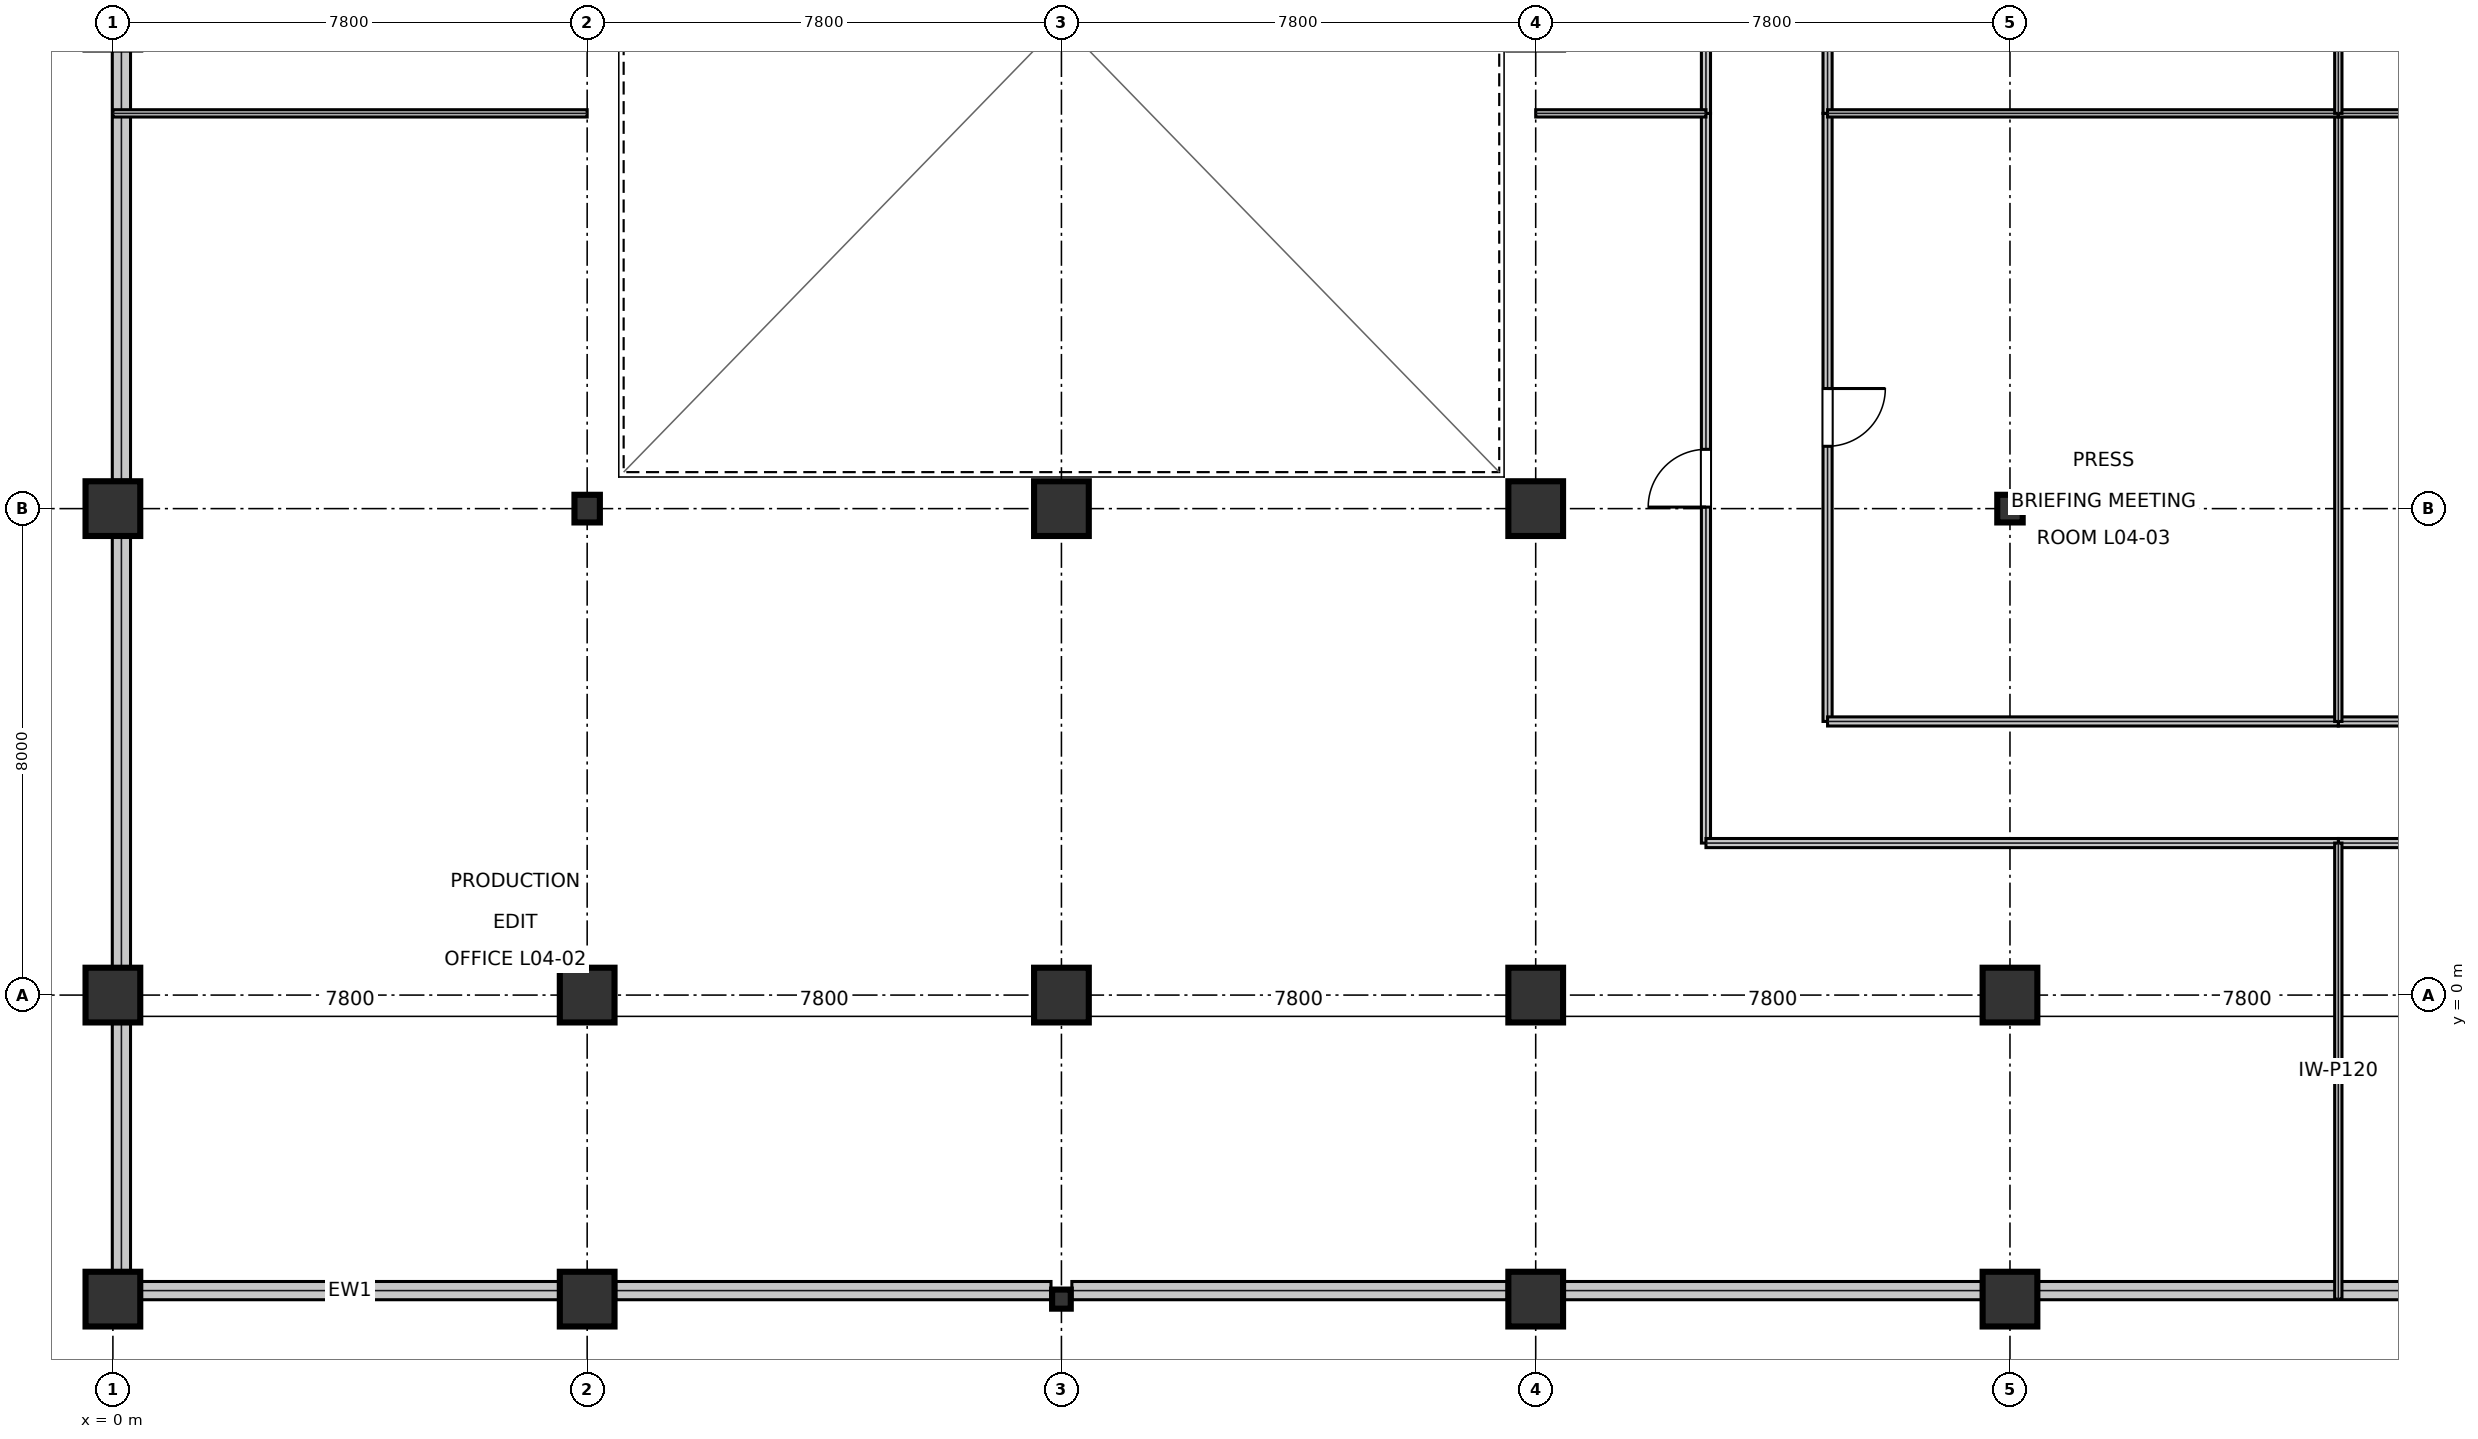
"""IFC4 building model, lengths in metres.
Left out: names, types, materials, properties, quantities, classifications, styles, units other than length and angle.
Written with IfcOpenShell. Run it as: python <this file> out.ifc"""

import sys

from ifc_helpers import new_model, si_unit, direction, frame, frame_2d, origin, origin_2d, place, context, subcontext, project, spatial, rectangle, i_section, extrude, element, fill, save


model = new_model("IFC4")
c1 = context("Model", 3, precision=1e-05, world=origin(), true_north=direction((0.0, 1.0)))
c2 = subcontext(c1, "Body", "Model", "MODEL_VIEW")
j1 = project(units=[si_unit("LENGTHUNIT", "METRE"), si_unit("PLANEANGLEUNIT", "RADIAN")], contexts=[c1])
p1 = place(None, origin())
s1 = spatial("IfcSite", under=j1, at=p1, CompositionType="ELEMENT")
p2 = place(p1, origin())
s2 = spatial("IfcBuilding", under=s1, at=p2, CompositionType="ELEMENT")
p3 = place(p2, frame((0.0, 0.0, 21.6)))
s3 = spatial("IfcBuildingStorey", under=s2, at=p3, CompositionType="ELEMENT", Elevation=21.6)
for number, where, z_axis, x_axis in (
    (1, (0.0, -5.0, 0.0), (0.0, 0.0, 1.0), (1.0, 0.0, 0.0)),
    (2, (0.0, 0.0, 0.0), (0.0, 0.0, 1.0), (1.0, 0.0, 0.0)),
    (3, (0.0, 8.0, 0.0), (0.0, 0.0, 1.0), (1.0, 0.0, 0.0)),
    (4, (7.8, -5.0, 0.0), (0.0, 0.0, 1.0), (1.0, 0.0, 0.0)),
    (5, (7.8, 0.0, 0.0), (0.0, 0.0, 1.0), (1.0, 0.0, 0.0)),
):
    element("IfcColumn", number, at=place(p3, frame(where, z_axis=z_axis, x_axis=x_axis)), inside=s3, PredefinedType="COLUMN", context=c2, shape_type="SweptSolid", body=[
        extrude(rectangle(XDim=0.9, YDim=0.9, at=origin_2d()), origin(), (0.0, 0.0, 1.0), 5.395),
    ])
p4 = place(p3, frame((7.8, 8.0, 0.0), z_axis=(0.0, 0.0, 1.0), x_axis=(1.0, 0.0, 0.0)))
e6 = element("IfcColumn", 6, at=p4, inside=s3, PredefinedType="COLUMN", context=c2, shape_type="SweptSolid", body=[
    extrude(i_section(OverallWidth=0.418, OverallDepth=0.455, WebThickness=0.042, FlangeThickness=0.068, at=origin_2d()), origin(), (0.0, 0.0, 1.0), 5.395),
])
p5 = place(p3, frame((15.6, -5.0, 0.0), z_axis=(0.0, 0.0, 1.0), x_axis=(1.0, 0.0, 0.0)))
e7 = element("IfcColumn", 7, at=p5, inside=s3, PredefinedType="COLUMN", context=c2, shape_type="SweptSolid", body=[
    extrude(i_section(OverallWidth=0.307, OverallDepth=0.314, WebThickness=0.011, FlangeThickness=0.019, at=origin_2d()), origin(), (0.0, 0.0, 1.0), 5.395),
])
for number, where, z_axis, x_axis in (
    (8, (15.6, 0.0, 0.0), (0.0, 0.0, 1.0), (1.0, 0.0, 0.0)),
    (9, (15.6, 8.0, 0.0), (0.0, 0.0, 1.0), (1.0, 0.0, 0.0)),
    (10, (23.4, -5.0, 0.0), (0.0, 0.0, 1.0), (1.0, 0.0, 0.0)),
    (11, (23.4, 0.0, 0.0), (0.0, 0.0, 1.0), (1.0, 0.0, 0.0)),
    (12, (23.4, 8.0, 0.0), (0.0, 0.0, 1.0), (1.0, 0.0, 0.0)),
    (13, (31.2, -5.0, 0.0), (0.0, 0.0, 1.0), (1.0, 0.0, 0.0)),
    (14, (31.2, 0.0, 0.0), (0.0, 0.0, 1.0), (1.0, 0.0, 0.0)),
):
    element("IfcColumn", number, at=place(p3, frame(where, z_axis=z_axis, x_axis=x_axis)), inside=s3, PredefinedType="COLUMN", context=c2, shape_type="SweptSolid", body=[
        extrude(rectangle(XDim=0.9, YDim=0.9, at=origin_2d()), origin(), (0.0, 0.0, 1.0), 5.395),
    ])
p6 = place(p3, frame((31.2, 8.0, 0.0), z_axis=(0.0, 0.0, 1.0), x_axis=(1.0, 0.0, 0.0)))
e15 = element("IfcColumn", 15, at=p6, inside=s3, PredefinedType="COLUMN", context=c2, shape_type="SweptSolid", body=[
    extrude(i_section(OverallWidth=0.418, OverallDepth=0.455, WebThickness=0.042, FlangeThickness=0.068, at=origin_2d()), origin(), (0.0, 0.0, 1.0), 5.395),
])
p7 = place(p3, frame((0.468, -4.86, 0.0), z_axis=(0.0, 0.0, 1.0), x_axis=(1.0, 0.0, 0.0)))
e16 = element("IfcWall", 16, at=p7, inside=s3, PredefinedType="STANDARD", context=c2, shape_type="SweptSolid", body=[
    extrude(rectangle(XDim=6.864, YDim=0.3, at=frame_2d((3.432, 0.0))), origin(), (0.0, 0.0, 1.0), 4.608),
])
for number, where, z_axis, x_axis in (
    (17, (8.268, -4.86, 0.0), (0.0, 0.0, 1.0), (1.0, 0.0, 0.0)),
    (18, (15.771, -4.86, 0.0), (0.0, 0.0, 1.0), (1.0, 0.0, 0.0)),
):
    element("IfcWall", number, at=place(p3, frame(where, z_axis=z_axis, x_axis=x_axis)), inside=s3, PredefinedType="STANDARD", context=c2, shape_type="SweptSolid", body=[
        extrude(rectangle(XDim=7.16, YDim=0.3, at=frame_2d((3.58, 0.0))), origin(), (0.0, 0.0, 1.0), 4.608),
    ])
for number, where, z_axis, x_axis in (
    (19, (23.868, -4.86, 0.0), (0.0, 0.0, 1.0), (1.0, 0.0, 0.0)),
    (20, (31.668, -4.86, 0.0), (0.0, 0.0, 1.0), (1.0, 0.0, 0.0)),
):
    element("IfcWall", number, at=place(p3, frame(where, z_axis=z_axis, x_axis=x_axis)), inside=s3, PredefinedType="STANDARD", context=c2, shape_type="SweptSolid", body=[
        extrude(rectangle(XDim=6.864, YDim=0.3, at=frame_2d((3.432, 0.0))), origin(), (0.0, 0.0, 1.0), 4.608),
    ])
for number, where, z_axis, x_axis in (
    (21, (0.14, 15.532, 0.0), (0.0, 0.0, 1.0), (0.0, -1.0, 0.0)),
    (22, (0.14, 7.532, 0.0), (0.0, 0.0, 1.0), (0.0, -1.0, 0.0)),
):
    element("IfcWall", number, at=place(p3, frame(where, z_axis=z_axis, x_axis=x_axis)), inside=s3, PredefinedType="STANDARD", context=c2, shape_type="SweptSolid", body=[
        extrude(rectangle(XDim=7.064, YDim=0.3, at=frame_2d((3.532, 0.0))), origin(), (0.0, 0.0, 1.0), 4.608),
    ])
p8 = place(p3, frame((0.14, -0.468, 0.0), z_axis=(0.0, 0.0, 1.0), x_axis=(0.0, -1.0, 0.0)))
e23 = element("IfcWall", 23, at=p8, inside=s3, PredefinedType="STANDARD", context=c2, shape_type="SweptSolid", body=[
    extrude(rectangle(XDim=4.064, YDim=0.3, at=frame_2d((2.032, 0.0))), origin(), (0.0, 0.0, 1.0), 4.608),
])
p9 = place(p3, frame((36.6, 2.5, 0.0), z_axis=(0.0, 0.0, 1.0), x_axis=(1.0, 0.0, 0.0)))
e24 = element("IfcWall", 24, at=p9, inside=s3, PredefinedType="PARTITIONING", context=c2, shape_type="SweptSolid", body=[
    extrude(rectangle(XDim=10.2, YDim=0.15, at=frame_2d((5.1, 0.0))), origin(), (0.0, 0.0, 1.0), 4.375),
])
p10 = place(p9, frame((4.625, 0.0, 0.0)))
e25 = element("IfcOpeningElement", 25, at=p10, cuts=e24, PredefinedType="OPENING", context=c2, shape_type="SweptSolid", body=[
    extrude(rectangle(XDim=0.95, YDim=2.15, at=frame_2d((0.475, 1.075))), frame((0.0, 0.085, 0.0), z_axis=(0.0, -1.0, 0.0), x_axis=(1.0, 0.0, 0.0)), (0.0, 0.0, 1.0), 0.17),
])
p11 = place(p3, frame((26.2, 2.5, 0.0), z_axis=(0.0, 0.0, 1.0), x_axis=(0.0, 1.0, 0.0)))
e26 = element("IfcWall", 26, at=p11, inside=s3, PredefinedType="PARTITIONING", context=c2, shape_type="SweptSolid", body=[
    extrude(rectangle(XDim=12.0, YDim=0.15, at=frame_2d((6.0, 0.0))), origin(), (0.0, 0.0, 1.0), 4.298),
])
p12 = place(p11, frame((5.525, 0.0, 0.0)))
e27 = element("IfcOpeningElement", 27, at=p12, cuts=e26, PredefinedType="OPENING", context=c2, shape_type="SweptSolid", body=[
    extrude(rectangle(XDim=0.95, YDim=2.15, at=frame_2d((0.475, 1.075))), frame((0.0, 0.085, 0.0), z_axis=(0.0, -1.0, 0.0), x_axis=(1.0, 0.0, 0.0)), (0.0, 0.0, 1.0), 0.17),
])
p13 = place(p3, frame((28.2, 4.5, 0.0), z_axis=(0.0, 0.0, 1.0), x_axis=(0.0, 1.0, 0.0)))
e28 = element("IfcWall", 28, at=p13, inside=s3, PredefinedType="PARTITIONING", context=c2, shape_type="SweptSolid", body=[
    extrude(rectangle(XDim=10.0, YDim=0.15, at=frame_2d((5.0, 0.0))), origin(), (0.0, 0.0, 1.0), 4.298),
])
p14 = place(p13, frame((4.525, 0.0, 0.0)))
e29 = element("IfcOpeningElement", 29, at=p14, cuts=e28, PredefinedType="OPENING", context=c2, shape_type="SweptSolid", body=[
    extrude(rectangle(XDim=0.95, YDim=2.15, at=frame_2d((0.475, 1.075))), frame((0.0, 0.085, 0.0), z_axis=(0.0, -1.0, 0.0), x_axis=(1.0, 0.0, 0.0)), (0.0, 0.0, 1.0), 0.17),
])
p15 = place(p3, frame((36.6, 4.5, 0.0), z_axis=(0.0, 0.0, 1.0), x_axis=(1.0, 0.0, 0.0)))
e30 = element("IfcWall", 30, at=p15, inside=s3, PredefinedType="PARTITIONING", context=c2, shape_type="SweptSolid", body=[
    extrude(rectangle(XDim=10.2, YDim=0.15, at=frame_2d((5.1, 0.0))), origin(), (0.0, 0.0, 1.0), 4.375),
])
p16 = place(p15, frame((4.625, 0.0, 0.0)))
e31 = element("IfcOpeningElement", 31, at=p16, cuts=e30, PredefinedType="OPENING", context=c2, shape_type="SweptSolid", body=[
    extrude(rectangle(XDim=0.95, YDim=2.15, at=frame_2d((0.475, 1.075))), frame((0.0, 0.085, 0.0), z_axis=(0.0, -1.0, 0.0), x_axis=(1.0, 0.0, 0.0)), (0.0, 0.0, 1.0), 0.17),
])
p17 = place(p3, frame((28.2, 14.5, 0.0), z_axis=(0.0, 0.0, 1.0), x_axis=(0.0, 1.0, 0.0)))
e32 = element("IfcWall", 32, at=p17, inside=s3, PredefinedType="PARTITIONING", context=c2, shape_type="SweptSolid", body=[
    extrude(rectangle(XDim=11.7, YDim=0.15, at=frame_2d((5.85, 0.0))), origin(), (0.0, 0.0, 1.0), 3.648),
])
p18 = place(p17, frame((5.375, 0.0, 0.0)))
e33 = element("IfcOpeningElement", 33, at=p18, cuts=e32, PredefinedType="OPENING", context=c2, shape_type="SweptSolid", body=[
    extrude(rectangle(XDim=0.95, YDim=2.15, at=frame_2d((0.475, 1.075))), frame((0.0, 0.085, 0.0), z_axis=(0.0, -1.0, 0.0), x_axis=(1.0, 0.0, 0.0)), (0.0, 0.0, 1.0), 0.17),
])
p19 = place(p3, frame((26.2, 14.5, 0.0), z_axis=(0.0, 0.0, 1.0), x_axis=(0.0, 1.0, 0.0)))
e34 = element("IfcWall", 34, at=p19, inside=s3, PredefinedType="PARTITIONING", context=c2, shape_type="SweptSolid", body=[
    extrude(rectangle(XDim=11.7, YDim=0.15, at=frame_2d((5.85, 0.0))), origin(), (0.0, 0.0, 1.0), 3.648),
])
p20 = place(p19, frame((5.375, 0.0, 0.0)))
e35 = element("IfcOpeningElement", 35, at=p20, cuts=e34, PredefinedType="OPENING", context=c2, shape_type="SweptSolid", body=[
    extrude(rectangle(XDim=0.95, YDim=2.15, at=frame_2d((0.475, 1.075))), frame((0.0, 0.085, 0.0), z_axis=(0.0, -1.0, 0.0), x_axis=(1.0, 0.0, 0.0)), (0.0, 0.0, 1.0), 0.17),
])
p21 = place(p3, frame((26.2, 2.5, 0.0), z_axis=(0.0, 0.0, 1.0), x_axis=(1.0, 0.0, 0.0)))
e36 = element("IfcWall", 36, at=p21, inside=s3, PredefinedType="PARTITIONING", context=c2, shape_type="SweptSolid", body=[
    extrude(rectangle(XDim=10.4, YDim=0.15, at=frame_2d((5.2, 0.0))), origin(), (0.0, 0.0, 1.0), 4.375),
])
p22 = place(p3, frame((28.2, 4.5, 0.0), z_axis=(0.0, 0.0, 1.0), x_axis=(1.0, 0.0, 0.0)))
e37 = element("IfcWall", 37, at=p22, inside=s3, PredefinedType="PARTITIONING", context=c2, shape_type="SweptSolid", body=[
    extrude(rectangle(XDim=8.4, YDim=0.15, at=frame_2d((4.2, 0.0))), origin(), (0.0, 0.0, 1.0), 4.375),
])
p23 = place(p3, frame((36.6, -5.0, 0.0), z_axis=(0.0, 0.0, 1.0), x_axis=(0.0, 1.0, 0.0)))
e38 = element("IfcWall", 38, at=p23, inside=s3, PredefinedType="PARTITIONING", context=c2, shape_type="SweptSolid", body=[
    extrude(rectangle(XDim=7.5, YDim=0.12, at=frame_2d((3.75, 0.0))), origin(), (0.0, 0.0, 1.0), 4.298),
])
p24 = place(p3, frame((23.4, 14.5, 0.0), z_axis=(0.0, 0.0, 1.0), x_axis=(1.0, 0.0, 0.0)))
e39 = element("IfcWall", 39, at=p24, inside=s3, PredefinedType="PARTITIONING", context=c2, shape_type="SweptSolid", body=[
    extrude(rectangle(XDim=2.8, YDim=0.12, at=frame_2d((1.4, 0.0))), origin(), (0.0, 0.0, 1.0), 5.08),
])
p25 = place(p3, frame((0.0, 14.5, 0.0), z_axis=(0.0, 0.0, 1.0), x_axis=(1.0, 0.0, 0.0)))
e40 = element("IfcWall", 40, at=p25, inside=s3, PredefinedType="PARTITIONING", context=c2, shape_type="SweptSolid", body=[
    extrude(rectangle(XDim=7.8, YDim=0.12, at=frame_2d((3.9, 0.0))), origin(), (0.0, 0.0, 1.0), 5.08),
])
p26 = place(p3, frame((36.6, 4.5, 0.0), z_axis=(0.0, 0.0, 1.0), x_axis=(0.0, 1.0, 0.0)))
e41 = element("IfcWall", 41, at=p26, inside=s3, PredefinedType="PARTITIONING", context=c2, shape_type="SweptSolid", body=[
    extrude(rectangle(XDim=10.0, YDim=0.12, at=frame_2d((5.0, 0.0))), origin(), (0.0, 0.0, 1.0), 4.298),
])
p27 = place(p3, frame((28.2, 14.5, 0.0), z_axis=(0.0, 0.0, 1.0), x_axis=(1.0, 0.0, 0.0)))
e42 = element("IfcWall", 42, at=p27, inside=s3, PredefinedType="PARTITIONING", context=c2, shape_type="SweptSolid", body=[
    extrude(rectangle(XDim=8.4, YDim=0.12, at=frame_2d((4.2, 0.0))), origin(), (0.0, 0.0, 1.0), 3.648),
])
p28 = place(p3, frame((36.6, 14.5, 0.0), z_axis=(0.0, 0.0, 1.0), x_axis=(1.0, 0.0, 0.0)))
e43 = element("IfcWall", 43, at=p28, inside=s3, PredefinedType="PARTITIONING", context=c2, shape_type="SweptSolid", body=[
    extrude(rectangle(XDim=10.2, YDim=0.12, at=frame_2d((5.1, 0.0))), origin(), (0.0, 0.0, 1.0), 4.375),
])
p29 = place(p3, frame((36.6, 14.5, 0.0), z_axis=(0.0, 0.0, 1.0), x_axis=(0.0, 1.0, 0.0)))
e44 = element("IfcWall", 44, at=p29, inside=s3, PredefinedType="PARTITIONING", context=c2, shape_type="SweptSolid", body=[
    extrude(rectangle(XDim=11.7, YDim=0.12, at=frame_2d((5.85, 0.0))), origin(), (0.0, 0.0, 1.0), 3.648),
])
p30 = place(p12, origin())
e45 = element("IfcDoor", 45, at=p30, inside=s3, OperationType="SINGLE_SWING_LEFT", PredefinedType="DOOR", context=c2, shape_type="SweptSolid", body=[
    extrude(rectangle(XDim=0.95, YDim=2.15, at=frame_2d((0.475, 1.075))), frame((0.0, 0.025, 0.0), z_axis=(0.0, -1.0, 0.0), x_axis=(1.0, 0.0, 0.0)), (0.0, 0.0, 1.0), 0.05),
])
fill(e27, e45)
p31 = place(p14, frame((0.95, 0.0, 0.0), z_axis=(0.0, 0.0, 1.0), x_axis=(-1.0, 0.0, 0.0)))
e46 = element("IfcDoor", 46, at=p31, inside=s3, OperationType="SINGLE_SWING_LEFT", PredefinedType="DOOR", context=c2, shape_type="SweptSolid", body=[
    extrude(rectangle(XDim=0.95, YDim=2.15, at=frame_2d((0.475, 1.075))), frame((0.0, 0.025, 0.0), z_axis=(0.0, -1.0, 0.0), x_axis=(1.0, 0.0, 0.0)), (0.0, 0.0, 1.0), 0.05),
])
fill(e29, e46)
save(model, sys.argv[1])
